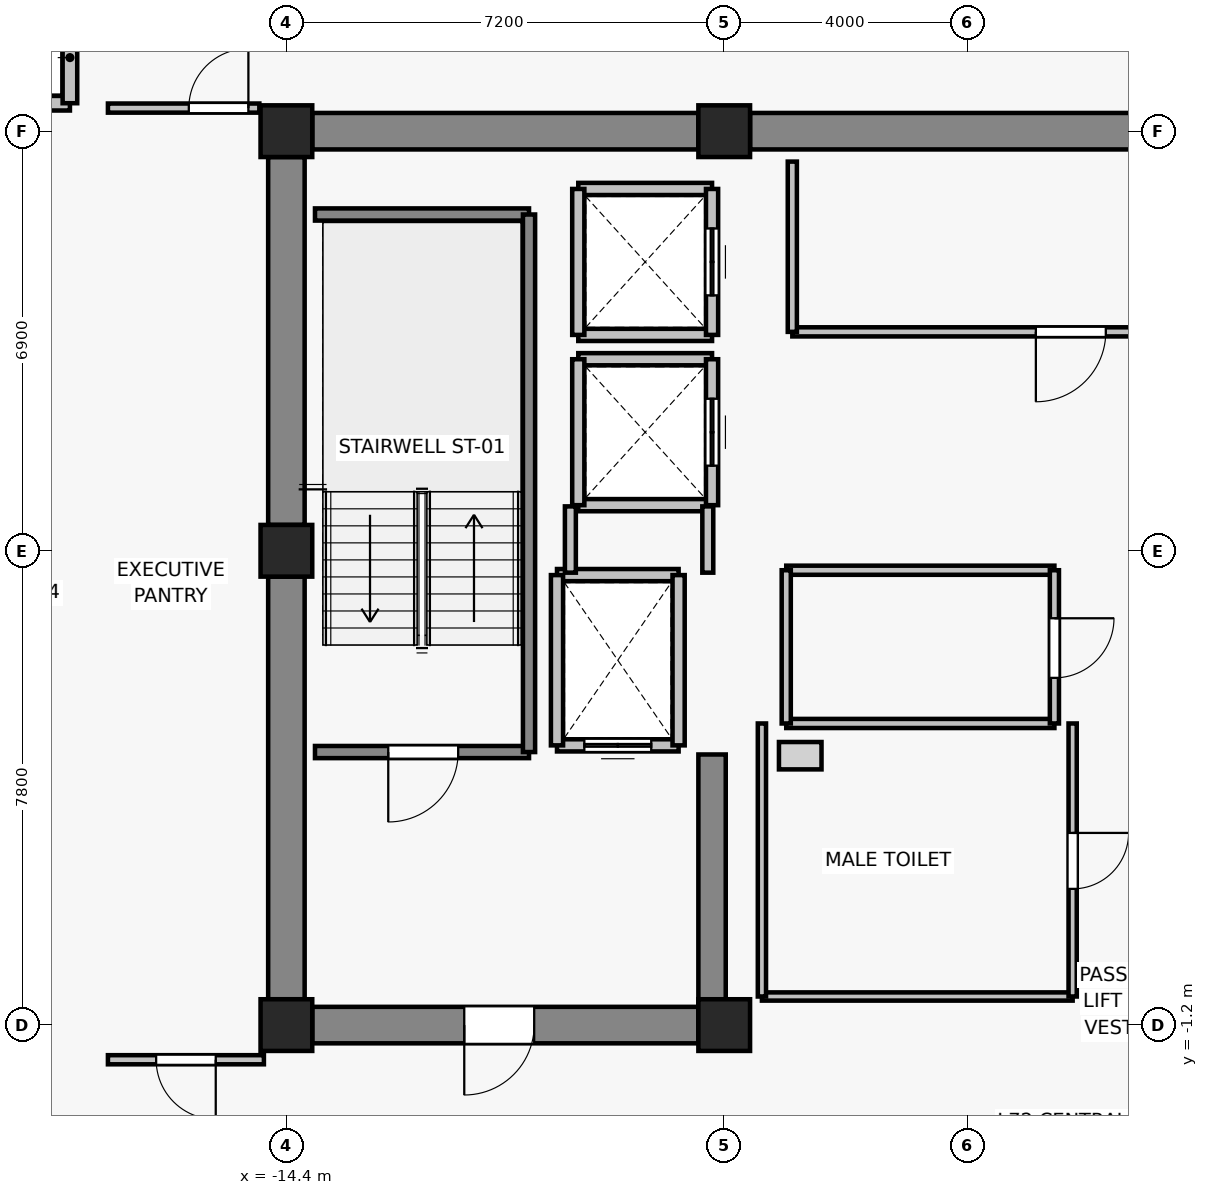
"""IFC4 building model, lengths in metres.
Left out: names, types, materials, properties, quantities, classifications, styles, units other than length and angle.
Written with IfcOpenShell. Run it as: python <this file> out.ifc"""

import sys

from ifc_helpers import new_model, si_unit, direction, frame, frame_2d, origin, origin_2d, place, context, subcontext, project, spatial, rectangle, extrude, source, transform, mapped, element, fill, save


model = new_model("IFC4")
c1 = context("Model", 3, precision=1e-05, world=origin(), true_north=direction((0.0, 1.0)))
c2 = subcontext(c1, "Body", "Model", "MODEL_VIEW")
j1 = project(units=[si_unit("LENGTHUNIT", "METRE"), si_unit("PLANEANGLEUNIT", "RADIAN")], contexts=[c1])
p1 = place(None, origin())
s1 = spatial("IfcSite", under=j1, at=p1, CompositionType="ELEMENT")
p2 = place(p1, origin())
s2 = spatial("IfcBuilding", under=s1, at=p2, CompositionType="ELEMENT")
p3 = place(p2, frame((0.0, 0.0, 255.1)))
s3 = spatial("IfcBuildingStorey", under=s2, at=p3, CompositionType="ELEMENT", Elevation=255.1)
for number, where, z_axis, x_axis in (
    (1, (-14.4, -1.2, 0.0), (0.0, 0.0, 1.0), (1.0, 0.0, 0.0)),
    (2, (-7.2, -1.2, 0.0), (0.0, 0.0, 1.0), (1.0, 0.0, 0.0)),
    (3, (-14.4, 6.6, 0.0), (0.0, 0.0, 1.0), (1.0, 0.0, 0.0)),
    (4, (-14.4, 13.5, 0.0), (0.0, 0.0, 1.0), (1.0, 0.0, 0.0)),
    (5, (-7.2, 13.5, 0.0), (0.0, 0.0, 1.0), (1.0, 0.0, 0.0)),
):
    element("IfcColumn", number, at=place(p3, frame(where, z_axis=z_axis, x_axis=x_axis)), inside=s3, PredefinedType="COLUMN", context=c2, shape_type="SweptSolid", body=[
        extrude(rectangle(XDim=0.85, YDim=0.85, at=origin_2d()), origin(), (0.0, 0.0, 1.0), 3.3),
    ])
p4 = place(p3, frame((-13.975, 13.5, 0.0), z_axis=(0.0, 0.0, 1.0), x_axis=(1.0, 0.0, 0.0)))
e6 = element("IfcWall", 6, at=p4, inside=s3, PredefinedType="SHEAR", context=c2, shape_type="SweptSolid", body=[
    extrude(rectangle(XDim=6.35, YDim=0.6, at=frame_2d((3.175, 0.0))), origin(), (0.0, 0.0, 1.0), 3.075),
])
p5 = place(p3, frame((-6.775, 13.5, 0.0), z_axis=(0.0, 0.0, 1.0), x_axis=(1.0, 0.0, 0.0)))
e7 = element("IfcWall", 7, at=p5, inside=s3, PredefinedType="SHEAR", context=c2, shape_type="SweptSolid", body=[
    extrude(rectangle(XDim=13.55, YDim=0.6, at=frame_2d((6.775, 0.0))), origin(), (0.0, 0.0, 1.0), 3.075),
])
p6 = place(p3, frame((-14.4, -0.775, 0.0), z_axis=(0.0, 0.0, 1.0), x_axis=(0.0, 1.0, 0.0)))
e8 = element("IfcWall", 8, at=p6, inside=s3, PredefinedType="SHEAR", context=c2, shape_type="SweptSolid", body=[
    extrude(rectangle(XDim=6.95, YDim=0.6, at=frame_2d((3.475, 0.0))), origin(), (0.0, 0.0, 1.0), 3.075),
])
p7 = place(p3, frame((-14.4, 7.025, 0.0), z_axis=(0.0, 0.0, 1.0), x_axis=(0.0, 1.0, 0.0)))
e9 = element("IfcWall", 9, at=p7, inside=s3, PredefinedType="SHEAR", context=c2, shape_type="SweptSolid", body=[
    extrude(rectangle(XDim=6.05, YDim=0.6, at=frame_2d((3.025, 0.0))), origin(), (0.0, 0.0, 1.0), 3.075),
])
p8 = place(p3, frame((-7.625, -1.2, 0.0), z_axis=(0.0, 0.0, 1.0), x_axis=(-1.0, 0.0, 0.0)))
e10 = element("IfcWall", 10, at=p8, inside=s3, PredefinedType="SHEAR", context=c2, shape_type="SweptSolid", body=[
    extrude(rectangle(XDim=6.35, YDim=0.6, at=frame_2d((3.175, 0.0))), origin(), (0.0, 0.0, 1.0), 3.075),
])
p9 = place(p8, frame((2.7, 0.0, 0.0)))
e11 = element("IfcOpeningElement", 11, at=p9, cuts=e10, PredefinedType="OPENING", context=c2, shape_type="SweptSolid", body=[
    extrude(rectangle(XDim=1.15, YDim=2.15, at=frame_2d((0.575, 1.075))), frame((0.0, 0.31, 0.0), z_axis=(0.0, -1.0, 0.0), x_axis=(1.0, 0.0, 0.0)), (0.0, 0.0, 1.0), 0.62),
])
p10 = place(p3, frame((-7.4, -0.9, 0.0), z_axis=(0.0, 0.0, 1.0), x_axis=(0.0, 1.0, 0.0)))
e12 = element("IfcWall", 12, at=p10, inside=s3, PredefinedType="SHEAR", context=c2, shape_type="SweptSolid", body=[
    extrude(rectangle(XDim=4.15, YDim=0.45, at=frame_2d((2.075, 0.0))), origin(), (0.0, 0.0, 1.0), 3.075),
])
for number, where, z_axis, x_axis in (
    (13, (-17.96, 13.96, 0.0), (0.0, 0.0, 1.0), (-1.0, 0.0, 0.0)),
    (14, (-17.96, 15.46, 0.0), (0.0, 0.0, 1.0), (0.0, -1.0, 0.0)),
):
    element("IfcWall", number, at=place(p3, frame(where, z_axis=z_axis, x_axis=x_axis)), inside=s3, PredefinedType="SOLIDWALL", context=c2, shape_type="SweptSolid", body=[
        extrude(rectangle(XDim=1.5, YDim=0.24, at=frame_2d((0.75, 0.0))), origin(), (0.0, 0.0, 1.0), 3.075),
    ])
p11 = place(p3, frame((-7.95, 3.4, 0.0), z_axis=(0.0, 0.0, 1.0), x_axis=(-1.0, 0.0, 0.0)))
e15 = element("IfcWall", 15, at=p11, inside=s3, PredefinedType="SOLIDWALL", context=c2, shape_type="SweptSolid", body=[
    extrude(rectangle(XDim=2.0, YDim=0.2, at=frame_2d((1.0, 0.0))), origin(), (0.0, 0.0, 1.0), 3.075),
])
p12 = place(p11, frame((0.45, 0.0, 0.0)))
e16 = element("IfcOpeningElement", 16, at=p12, cuts=e15, PredefinedType="OPENING", context=c2, shape_type="SweptSolid", body=[
    extrude(rectangle(XDim=1.1, YDim=2.2, at=frame_2d((0.55, 1.1))), frame((0.0, 0.11, 0.0), z_axis=(0.0, -1.0, 0.0), x_axis=(1.0, 0.0, 0.0)), (0.0, 0.0, 1.0), 0.22),
])
p13 = place(p3, frame((-9.95, 6.2, 0.0), z_axis=(0.0, 0.0, 1.0), x_axis=(1.0, 0.0, 0.0)))
e17 = element("IfcWall", 17, at=p13, inside=s3, PredefinedType="SOLIDWALL", context=c2, shape_type="SweptSolid", body=[
    extrude(rectangle(XDim=2.0, YDim=0.2, at=frame_2d((1.0, 0.0))), origin(), (0.0, 0.0, 1.0), 3.075),
])
for number, where, z_axis, x_axis in (
    (18, (-9.95, 3.4, 0.0), (0.0, 0.0, 1.0), (0.0, 1.0, 0.0)),
    (19, (-7.95, 6.2, 0.0), (0.0, 0.0, 1.0), (0.0, -1.0, 0.0)),
):
    element("IfcWall", number, at=place(p3, frame(where, z_axis=z_axis, x_axis=x_axis)), inside=s3, PredefinedType="SOLIDWALL", context=c2, shape_type="SweptSolid", body=[
        extrude(rectangle(XDim=2.8, YDim=0.2, at=frame_2d((1.4, 0.0))), origin(), (0.0, 0.0, 1.0), 3.075),
    ])
for number, where, z_axis, x_axis in (
    (20, (-7.4, 7.35, 0.0), (0.0, 0.0, 1.0), (-1.0, 0.0, 0.0)),
    (21, (-9.6, 9.75, 0.0), (0.0, 0.0, 1.0), (1.0, 0.0, 0.0)),
):
    element("IfcWall", number, at=place(p3, frame(where, z_axis=z_axis, x_axis=x_axis)), inside=s3, PredefinedType="SOLIDWALL", context=c2, shape_type="SweptSolid", body=[
        extrude(rectangle(XDim=2.2, YDim=0.2, at=frame_2d((1.1, 0.0))), origin(), (0.0, 0.0, 1.0), 2.615),
    ])
p14 = place(p3, frame((-9.6, 7.35, 0.0), z_axis=(0.0, 0.0, 1.0), x_axis=(0.0, 1.0, 0.0)))
e22 = element("IfcWall", 22, at=p14, inside=s3, PredefinedType="SOLIDWALL", context=c2, shape_type="SweptSolid", body=[
    extrude(rectangle(XDim=2.4, YDim=0.2, at=frame_2d((1.2, 0.0))), origin(), (0.0, 0.0, 1.0), 3.075),
])
p15 = place(p3, frame((-7.4, 9.75, 0.0), z_axis=(0.0, 0.0, 1.0), x_axis=(0.0, -1.0, 0.0)))
e23 = element("IfcWall", 23, at=p15, inside=s3, PredefinedType="SOLIDWALL", context=c2, shape_type="SweptSolid", body=[
    extrude(rectangle(XDim=2.4, YDim=0.2, at=frame_2d((1.2, 0.0))), origin(), (0.0, 0.0, 1.0), 2.615),
])
p16 = place(p15, frame((0.65, 0.0, 0.0)))
e24 = element("IfcOpeningElement", 24, at=p16, cuts=e23, PredefinedType="OPENING", context=c2, shape_type="SweptSolid", body=[
    extrude(rectangle(XDim=1.1, YDim=2.2, at=frame_2d((0.55, 1.1))), frame((0.0, 0.11, 0.0), z_axis=(0.0, -1.0, 0.0), x_axis=(1.0, 0.0, 0.0)), (0.0, 0.0, 1.0), 0.22),
])
for number, where, z_axis, x_axis in (
    (25, (-7.4, 10.15, 0.0), (0.0, 0.0, 1.0), (-1.0, 0.0, 0.0)),
    (26, (-9.6, 12.55, 0.0), (0.0, 0.0, 1.0), (1.0, 0.0, 0.0)),
):
    element("IfcWall", number, at=place(p3, frame(where, z_axis=z_axis, x_axis=x_axis)), inside=s3, PredefinedType="SOLIDWALL", context=c2, shape_type="SweptSolid", body=[
        extrude(rectangle(XDim=2.2, YDim=0.2, at=frame_2d((1.1, 0.0))), origin(), (0.0, 0.0, 1.0), 2.615),
    ])
p17 = place(p3, frame((-9.6, 10.15, 0.0), z_axis=(0.0, 0.0, 1.0), x_axis=(0.0, 1.0, 0.0)))
e27 = element("IfcWall", 27, at=p17, inside=s3, PredefinedType="SOLIDWALL", context=c2, shape_type="SweptSolid", body=[
    extrude(rectangle(XDim=2.4, YDim=0.2, at=frame_2d((1.2, 0.0))), origin(), (0.0, 0.0, 1.0), 3.075),
])
p18 = place(p3, frame((-7.4, 12.55, 0.0), z_axis=(0.0, 0.0, 1.0), x_axis=(0.0, -1.0, 0.0)))
e28 = element("IfcWall", 28, at=p18, inside=s3, PredefinedType="SOLIDWALL", context=c2, shape_type="SweptSolid", body=[
    extrude(rectangle(XDim=2.4, YDim=0.2, at=frame_2d((1.2, 0.0))), origin(), (0.0, 0.0, 1.0), 2.615),
])
p19 = place(p18, frame((0.65, 0.0, 0.0)))
e29 = element("IfcOpeningElement", 29, at=p19, cuts=e28, PredefinedType="OPENING", context=c2, shape_type="SweptSolid", body=[
    extrude(rectangle(XDim=1.1, YDim=2.2, at=frame_2d((0.55, 1.1))), frame((0.0, 0.11, 0.0), z_axis=(0.0, -1.0, 0.0), x_axis=(1.0, 0.0, 0.0)), (0.0, 0.0, 1.0), 0.22),
])
p20 = place(p3, frame((-10.41, 3.29, 0.0), z_axis=(0.0, 0.0, 1.0), x_axis=(-1.0, 0.0, 0.0)))
e30 = element("IfcWall", 30, at=p20, inside=s3, PredefinedType="SOLIDWALL", context=c2, shape_type="SweptSolid", body=[
    extrude(rectangle(XDim=3.52, YDim=0.2, at=frame_2d((1.76, 0.0))), origin(), (0.0, 0.0, 1.0), 3.075),
])
p21 = place(p20, frame((1.165, 0.0, 0.0)))
e31 = element("IfcOpeningElement", 31, at=p21, cuts=e30, PredefinedType="OPENING", context=c2, shape_type="SweptSolid", body=[
    extrude(rectangle(XDim=1.15, YDim=2.15, at=frame_2d((0.575, 1.075))), frame((0.0, 0.11, 0.0), z_axis=(0.0, -1.0, 0.0), x_axis=(1.0, 0.0, 0.0)), (0.0, 0.0, 1.0), 0.22),
])
p22 = place(p3, frame((-13.93, 12.13, 0.0), z_axis=(0.0, 0.0, 1.0), x_axis=(1.0, 0.0, 0.0)))
e32 = element("IfcWall", 32, at=p22, inside=s3, PredefinedType="SOLIDWALL", context=c2, shape_type="SweptSolid", body=[
    extrude(rectangle(XDim=3.52, YDim=0.2, at=frame_2d((1.76, 0.0))), origin(), (0.0, 0.0, 1.0), 3.075),
])
p23 = place(p3, frame((-10.41, 12.13, 0.0), z_axis=(0.0, 0.0, 1.0), x_axis=(0.0, -1.0, 0.0)))
e33 = element("IfcWall", 33, at=p23, inside=s3, PredefinedType="SOLIDWALL", context=c2, shape_type="SweptSolid", body=[
    extrude(rectangle(XDim=8.84, YDim=0.2, at=frame_2d((4.42, 0.0))), origin(), (0.0, 0.0, 1.0), 3.075),
])
p24 = place(p3, frame((-9.73, 6.24, 0.0), z_axis=(0.0, 0.0, 1.0), x_axis=(0.0, 1.0, 0.0)))
e34 = element("IfcWall", 34, at=p24, inside=s3, PredefinedType="PARTITIONING", context=c2, shape_type="SweptSolid", body=[
    extrude(rectangle(XDim=1.09, YDim=0.18, at=frame_2d((0.545, 0.0))), origin(), (0.0, 0.0, 1.0), 3.075),
])
p25 = place(p3, frame((-7.47, 7.33, 0.0), z_axis=(0.0, 0.0, 1.0), x_axis=(0.0, -1.0, 0.0)))
e35 = element("IfcWall", 35, at=p25, inside=s3, PredefinedType="PARTITIONING", context=c2, shape_type="SweptSolid", body=[
    extrude(rectangle(XDim=1.09, YDim=0.18, at=frame_2d((0.545, 0.0))), origin(), (0.0, 0.0, 1.0), 2.615),
])
p26 = place(p3, frame((6.08, 10.2, 0.0), z_axis=(0.0, 0.0, 1.0), x_axis=(-1.0, 0.0, 0.0)))
e36 = element("IfcWall", 36, at=p26, inside=s3, PredefinedType="PARTITIONING", context=c2, shape_type="SweptSolid", body=[
    extrude(rectangle(XDim=12.16, YDim=0.15, at=frame_2d((6.08, 0.0))), origin(), (0.0, 0.0, 1.0), 3.075),
])
p27 = place(p26, frame((7.005, 0.0, 0.0)))
e37 = element("IfcOpeningElement", 37, at=p27, cuts=e36, PredefinedType="OPENING", context=c2, shape_type="SweptSolid", body=[
    extrude(rectangle(XDim=1.15, YDim=2.15, at=frame_2d((0.575, 1.075))), frame((0.0, 0.085, 0.0), z_axis=(0.0, -1.0, 0.0), x_axis=(1.0, 0.0, 0.0)), (0.0, 0.0, 1.0), 0.17),
])
p28 = place(p3, frame((-6.08, 10.2, 0.0), z_axis=(0.0, 0.0, 1.0), x_axis=(0.0, 1.0, 0.0)))
e38 = element("IfcWall", 38, at=p28, inside=s3, PredefinedType="PARTITIONING", context=c2, shape_type="SweptSolid", body=[
    extrude(rectangle(XDim=2.8, YDim=0.15, at=frame_2d((1.4, 0.0))), origin(), (0.0, 0.0, 1.0), 3.075),
])
for number, where, z_axis, x_axis in (
    (39, (-1.77, 3.76, 0.0), (0.0, 0.0, 1.0), (-1.0, 0.0, 0.0)),
    (40, (-6.18, 6.28, 0.0), (0.0, 0.0, 1.0), (1.0, 0.0, 0.0)),
):
    element("IfcWall", number, at=place(p3, frame(where, z_axis=z_axis, x_axis=x_axis)), inside=s3, PredefinedType="PARTITIONING", context=c2, shape_type="SweptSolid", body=[
        extrude(rectangle(XDim=4.41, YDim=0.15, at=frame_2d((2.205, 0.0))), origin(), (0.0, 0.0, 1.0), 3.075),
    ])
p29 = place(p3, frame((-6.18, 3.76, 0.0), z_axis=(0.0, 0.0, 1.0), x_axis=(0.0, 1.0, 0.0)))
e41 = element("IfcWall", 41, at=p29, inside=s3, PredefinedType="PARTITIONING", context=c2, shape_type="SweptSolid", body=[
    extrude(rectangle(XDim=2.52, YDim=0.15, at=frame_2d((1.26, 0.0))), origin(), (0.0, 0.0, 1.0), 3.075),
])
p30 = place(p3, frame((-1.77, 6.28, 0.0), z_axis=(0.0, 0.0, 1.0), x_axis=(0.0, -1.0, 0.0)))
e42 = element("IfcWall", 42, at=p30, inside=s3, PredefinedType="PARTITIONING", context=c2, shape_type="SweptSolid", body=[
    extrude(rectangle(XDim=2.52, YDim=0.15, at=frame_2d((1.26, 0.0))), origin(), (0.0, 0.0, 1.0), 3.075),
])
p31 = place(p30, frame((0.79, 0.0, 0.0)))
e43 = element("IfcOpeningElement", 43, at=p31, cuts=e42, PredefinedType="OPENING", context=c2, shape_type="SweptSolid", body=[
    extrude(rectangle(XDim=0.98, YDim=2.15, at=frame_2d((0.49, 1.075))), frame((0.0, 0.085, 0.0), z_axis=(0.0, -1.0, 0.0), x_axis=(1.0, 0.0, 0.0)), (0.0, 0.0, 1.0), 0.17),
])
p32 = place(p3, frame((-1.47, -0.73, 0.0), z_axis=(0.0, 0.0, 1.0), x_axis=(-1.0, 0.0, 0.0)))
e44 = element("IfcWall", 44, at=p32, inside=s3, PredefinedType="PARTITIONING", context=c2, shape_type="SweptSolid", body=[
    extrude(rectangle(XDim=5.11, YDim=0.135, at=frame_2d((2.555, 0.0))), origin(), (0.0, 0.0, 1.0), 3.075),
])
p33 = place(p3, frame((-6.58, -0.73, 0.0), z_axis=(0.0, 0.0, 1.0), x_axis=(0.0, 1.0, 0.0)))
e45 = element("IfcWall", 45, at=p33, inside=s3, PredefinedType="PARTITIONING", context=c2, shape_type="SweptSolid", body=[
    extrude(rectangle(XDim=4.49, YDim=0.135, at=frame_2d((2.245, 0.0))), origin(), (0.0, 0.0, 1.0), 3.075),
])
p34 = place(p3, frame((-1.47, 3.76, 0.0), z_axis=(0.0, 0.0, 1.0), x_axis=(0.0, -1.0, 0.0)))
e46 = element("IfcWall", 46, at=p34, inside=s3, PredefinedType="PARTITIONING", context=c2, shape_type="SweptSolid", body=[
    extrude(rectangle(XDim=4.49, YDim=0.135, at=frame_2d((2.245, 0.0))), origin(), (0.0, 0.0, 1.0), 3.075),
])
p35 = place(p34, frame((1.8, 0.0, 0.0)))
e47 = element("IfcOpeningElement", 47, at=p35, cuts=e46, PredefinedType="OPENING", context=c2, shape_type="SweptSolid", body=[
    extrude(rectangle(XDim=0.92, YDim=2.1, at=frame_2d((0.46, 1.05))), frame((0.0, 0.077, 0.0), z_axis=(0.0, -1.0, 0.0), x_axis=(1.0, 0.0, 0.0)), (0.0, 0.0, 1.0), 0.155),
])
p36 = place(p3, frame((-14.77, -1.77, 0.0), z_axis=(0.0, 0.0, 1.0), x_axis=(-1.0, 0.0, 0.0)))
e48 = element("IfcWall", 48, at=p36, inside=s3, PredefinedType="PARTITIONING", context=c2, shape_type="SweptSolid", body=[
    extrude(rectangle(XDim=2.565, YDim=0.15, at=frame_2d((1.282, 0.0))), origin(), (0.0, 0.0, 1.0), 3.075),
])
p37 = place(p36, frame((0.792, 0.0, 0.0)))
e49 = element("IfcOpeningElement", 49, at=p37, cuts=e48, PredefinedType="OPENING", context=c2, shape_type="SweptSolid", body=[
    extrude(rectangle(XDim=0.98, YDim=2.15, at=frame_2d((0.49, 1.075))), frame((0.0, 0.085, 0.0), z_axis=(0.0, -1.0, 0.0), x_axis=(1.0, 0.0, 0.0)), (0.0, 0.0, 1.0), 0.17),
])
p38 = place(p3, frame((-17.335, 13.88, 0.0), z_axis=(0.0, 0.0, 1.0), x_axis=(1.0, 0.0, 0.0)))
e50 = element("IfcWall", 50, at=p38, inside=s3, PredefinedType="PARTITIONING", context=c2, shape_type="SweptSolid", body=[
    extrude(rectangle(XDim=2.49, YDim=0.15, at=frame_2d((1.245, 0.0))), origin(), (0.0, 0.0, 1.0), 3.075),
])
p39 = place(p38, frame((1.33, 0.0, 0.0)))
e51 = element("IfcOpeningElement", 51, at=p39, cuts=e50, PredefinedType="OPENING", context=c2, shape_type="SweptSolid", body=[
    extrude(rectangle(XDim=0.98, YDim=2.15, at=frame_2d((0.49, 1.075))), frame((0.0, 0.085, 0.0), z_axis=(0.0, -1.0, 0.0), x_axis=(1.0, 0.0, 0.0)), (0.0, 0.0, 1.0), 0.17),
])
m1 = source(origin(), c2, "Body", "SweptSolid", [
    extrude(rectangle(XDim=1.1, YDim=2.2, at=frame_2d((0.55, 1.1))), frame((0.0, 0.025, 0.0), z_axis=(0.0, -1.0, 0.0), x_axis=(1.0, 0.0, 0.0)), (0.0, 0.0, 1.0), 0.05),
])
p40 = place(p12, origin())
e52 = element("IfcDoor", 52, at=p40, inside=s3, OperationType="DOUBLE_DOOR_SLIDING", PredefinedType="DOOR", context=c2, shape_type="MappedRepresentation", body=[
    mapped(m1, transform((0.0, 0.0, 0.0), x_axis=(1.0, 0.0, 0.0), y_axis=(0.0, 1.0, 0.0), z_axis=(0.0, 0.0, 1.0), scale=1.0)),
])
fill(e16, e52)
p41 = place(p16, origin())
e53 = element("IfcDoor", 53, at=p41, inside=s3, OperationType="DOUBLE_DOOR_SLIDING", PredefinedType="DOOR", context=c2, shape_type="MappedRepresentation", body=[
    mapped(m1, transform((0.0, 0.0, 0.0), x_axis=(1.0, 0.0, 0.0), y_axis=(0.0, 1.0, 0.0), z_axis=(0.0, 0.0, 1.0), scale=1.0)),
])
fill(e24, e53)
p42 = place(p19, origin())
e54 = element("IfcDoor", 54, at=p42, inside=s3, OperationType="DOUBLE_DOOR_SLIDING", PredefinedType="DOOR", context=c2, shape_type="MappedRepresentation", body=[
    mapped(m1, transform((0.0, 0.0, 0.0), x_axis=(1.0, 0.0, 0.0), y_axis=(0.0, 1.0, 0.0), z_axis=(0.0, 0.0, 1.0), scale=1.0)),
])
fill(e29, e54)
m2 = source(origin(), c2, "Body", "SweptSolid", [
    extrude(rectangle(XDim=1.15, YDim=2.15, at=frame_2d((0.575, 1.075))), frame((0.0, 0.025, 0.0), z_axis=(0.0, -1.0, 0.0), x_axis=(1.0, 0.0, 0.0)), (0.0, 0.0, 1.0), 0.05),
])
p43 = place(p21, origin())
e55 = element("IfcDoor", 55, at=p43, inside=s3, OperationType="SINGLE_SWING_RIGHT", PredefinedType="DOOR", context=c2, shape_type="MappedRepresentation", body=[
    mapped(m2, transform((0.0, 0.0, 0.0), x_axis=(1.0, 0.0, 0.0), y_axis=(0.0, 1.0, 0.0), z_axis=(0.0, 0.0, 1.0), scale=1.0)),
])
fill(e31, e55)
p44 = place(p9, origin())
e56 = element("IfcDoor", 56, at=p44, inside=s3, OperationType="SINGLE_SWING_RIGHT", PredefinedType="DOOR", context=c2, shape_type="MappedRepresentation", body=[
    mapped(m2, transform((0.0, 0.0, 0.0), x_axis=(1.0, 0.0, 0.0), y_axis=(0.0, 1.0, 0.0), z_axis=(0.0, 0.0, 1.0), scale=1.0)),
])
fill(e11, e56)
p45 = place(p27, origin())
e57 = element("IfcDoor", 57, at=p45, inside=s3, OperationType="SINGLE_SWING_RIGHT", PredefinedType="DOOR", context=c2, shape_type="MappedRepresentation", body=[
    mapped(m2, transform((0.0, 0.0, 0.0), x_axis=(1.0, 0.0, 0.0), y_axis=(0.0, 1.0, 0.0), z_axis=(0.0, 0.0, 1.0), scale=1.0)),
])
fill(e37, e57)
m3 = source(origin(), c2, "Body", "SweptSolid", [
    extrude(rectangle(XDim=0.98, YDim=2.15, at=frame_2d((0.49, 1.075))), frame((0.0, 0.025, 0.0), z_axis=(0.0, -1.0, 0.0), x_axis=(1.0, 0.0, 0.0)), (0.0, 0.0, 1.0), 0.05),
])
p46 = place(p31, origin())
e58 = element("IfcDoor", 58, at=p46, inside=s3, OperationType="SINGLE_SWING_LEFT", PredefinedType="DOOR", context=c2, shape_type="MappedRepresentation", body=[
    mapped(m3, transform((0.0, 0.0, 0.0), x_axis=(1.0, 0.0, 0.0), y_axis=(0.0, 1.0, 0.0), z_axis=(0.0, 0.0, 1.0), scale=1.0)),
])
fill(e43, e58)
m4 = source(origin(), c2, "Body", "SweptSolid", [
    extrude(rectangle(XDim=0.92, YDim=2.1, at=frame_2d((0.46, 1.05))), frame((0.0, 0.025, 0.0), z_axis=(0.0, -1.0, 0.0), x_axis=(1.0, 0.0, 0.0)), (0.0, 0.0, 1.0), 0.05),
])
p47 = place(p35, origin())
e59 = element("IfcDoor", 59, at=p47, inside=s3, OperationType="SINGLE_SWING_LEFT", PredefinedType="DOOR", context=c2, shape_type="MappedRepresentation", body=[
    mapped(m4, transform((0.0, 0.0, 0.0), x_axis=(1.0, 0.0, 0.0), y_axis=(0.0, 1.0, 0.0), z_axis=(0.0, 0.0, 1.0), scale=1.0)),
])
fill(e47, e59)
p48 = place(p37, origin())
e60 = element("IfcDoor", 60, at=p48, inside=s3, OperationType="SINGLE_SWING_LEFT", PredefinedType="DOOR", context=c2, shape_type="MappedRepresentation", body=[
    mapped(m3, transform((0.0, 0.0, 0.0), x_axis=(1.0, 0.0, 0.0), y_axis=(0.0, 1.0, 0.0), z_axis=(0.0, 0.0, 1.0), scale=1.0)),
])
fill(e49, e60)
p49 = place(p39, origin())
e61 = element("IfcDoor", 61, at=p49, inside=s3, OperationType="SINGLE_SWING_RIGHT", PredefinedType="DOOR", context=c2, shape_type="MappedRepresentation", body=[
    mapped(m3, transform((0.0, 0.0, 0.0), x_axis=(1.0, 0.0, 0.0), y_axis=(0.0, 1.0, 0.0), z_axis=(0.0, 0.0, 1.0), scale=1.0)),
])
fill(e51, e61)
save(model, sys.argv[1])
